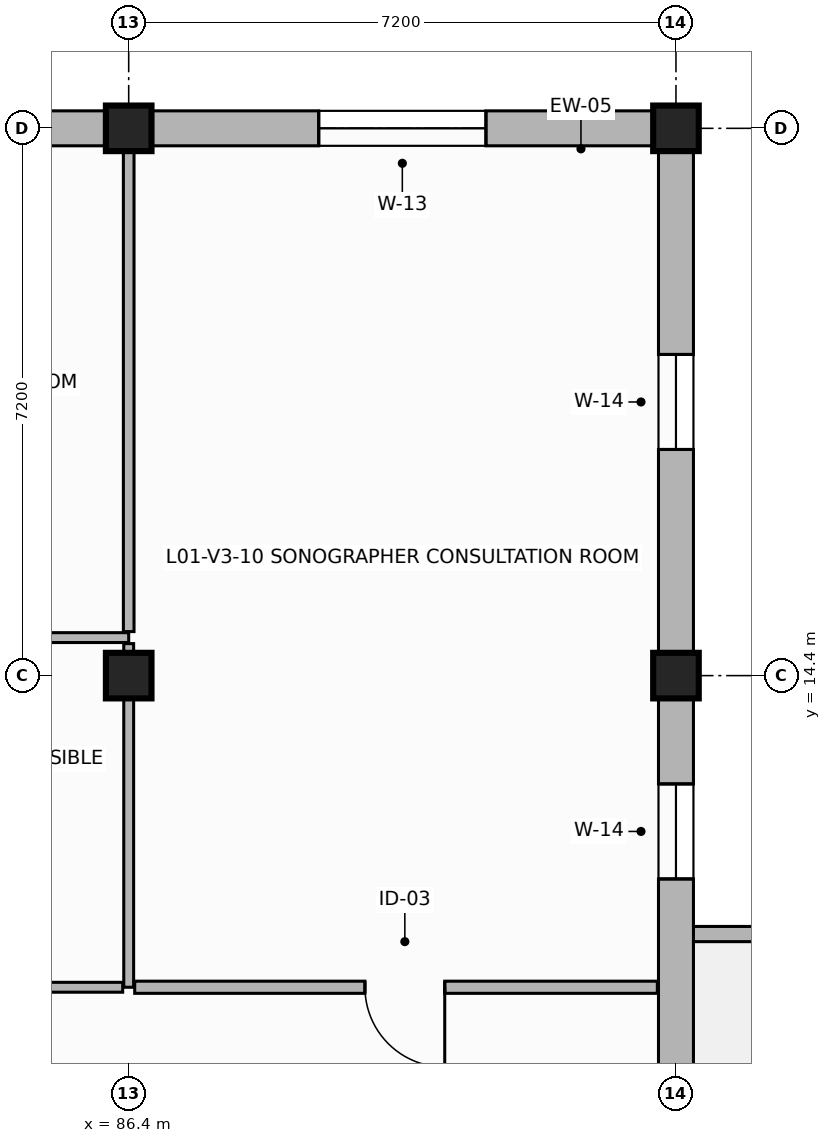
"""IFC4 building model, lengths in metres.
Left out: names, types, materials, properties, quantities, classifications, styles, units other than length and angle.
Written with IfcOpenShell. Run it as: python <this file> out.ifc"""

import sys

from ifc_helpers import new_model, si_unit, direction, frame, frame_2d, origin, origin_2d, place, context, subcontext, project, spatial, rectangle, extrude, element, fill, save


model = new_model("IFC4")
c1 = context("Model", 3, precision=1e-05, world=origin(), true_north=direction((0.0, 1.0)))
c2 = subcontext(c1, "Body", "Model", "MODEL_VIEW")
j1 = project(units=[si_unit("LENGTHUNIT", "METRE"), si_unit("PLANEANGLEUNIT", "RADIAN")], contexts=[c1])
p1 = place(None, origin())
s1 = spatial("IfcSite", under=j1, at=p1, CompositionType="ELEMENT")
p2 = place(p1, origin())
s2 = spatial("IfcBuilding", under=s1, at=p2, CompositionType="ELEMENT")
p3 = place(p2, frame((0.0, 0.0, 4.5)))
s3 = spatial("IfcBuildingStorey", under=s2, at=p3, CompositionType="ELEMENT", Elevation=4.5)
for number, where, z_axis, x_axis in (
    (1, (86.4, 14.4, 0.0), (0.0, 0.0, 1.0), (1.0, 0.0, 0.0)),
    (2, (86.4, 21.6, 0.0), (0.0, 0.0, 1.0), (1.0, 0.0, 0.0)),
    (3, (93.6, 14.4, 0.0), (0.0, 0.0, 1.0), (1.0, 0.0, 0.0)),
    (4, (93.6, 21.6, 0.0), (0.0, 0.0, 1.0), (1.0, 0.0, 0.0)),
):
    element("IfcColumn", number, at=place(p3, frame(where, z_axis=z_axis, x_axis=x_axis)), inside=s3, PredefinedType="COLUMN", context=c2, shape_type="SweptSolid", body=[
        extrude(rectangle(XDim=0.6, YDim=0.6, at=origin_2d()), origin(), (0.0, 0.0, 1.0), 3.55),
    ])
p4 = place(p3, frame((122.28, 11.0, 0.0), z_axis=(0.0, 0.0, 1.0), x_axis=(-1.0, 0.0, 0.0)))
e5 = element("IfcWall", 5, at=p4, inside=s3, PredefinedType="PARAPET", context=c2, shape_type="SweptSolid", body=[
    extrude(rectangle(XDim=28.56, YDim=0.2, at=frame_2d((14.28, 0.0))), origin(), (0.0, 0.0, 1.0), 0.95),
])
p5 = place(p3, frame((93.6, 7.2, 0.0), z_axis=(0.0, 0.0, 1.0), x_axis=(0.0, 1.0, 0.0)))
e6 = element("IfcWall", 6, at=p5, inside=s3, PredefinedType="SOLIDWALL", context=c2, shape_type="SweptSolid", body=[
    extrude(rectangle(XDim=7.2, YDim=0.46, at=frame_2d((3.6, 0.0))), origin(), (0.0, 0.0, 1.0), 2.83),
])
p6 = place(p5, frame((4.525, 0.0, 1.2)))
e7 = element("IfcOpeningElement", 7, at=p6, cuts=e6, PredefinedType="OPENING", context=c2, shape_type="SweptSolid", body=[
    extrude(rectangle(XDim=1.25, YDim=1.35, at=frame_2d((0.625, 0.675))), frame((0.0, 0.24, 0.0), z_axis=(0.0, -1.0, 0.0), x_axis=(1.0, 0.0, 0.0)), (0.0, 0.0, 1.0), 0.48),
])
p7 = place(p3, frame((93.6, 14.4, 0.0), z_axis=(0.0, 0.0, 1.0), x_axis=(0.0, 1.0, 0.0)))
e8 = element("IfcWall", 8, at=p7, inside=s3, PredefinedType="SOLIDWALL", context=c2, shape_type="SweptSolid", body=[
    extrude(rectangle(XDim=7.2, YDim=0.46, at=frame_2d((3.6, 0.0))), origin(), (0.0, 0.0, 1.0), 2.83),
])
p8 = place(p7, frame((2.975, 0.0, 1.2)))
e9 = element("IfcOpeningElement", 9, at=p8, cuts=e8, PredefinedType="OPENING", context=c2, shape_type="SweptSolid", body=[
    extrude(rectangle(XDim=1.25, YDim=1.35, at=frame_2d((0.625, 0.675))), frame((0.0, 0.24, 0.0), z_axis=(0.0, -1.0, 0.0), x_axis=(1.0, 0.0, 0.0)), (0.0, 0.0, 1.0), 0.48),
])
p9 = place(p3, frame((93.6, 21.6, 0.0), z_axis=(0.0, 0.0, 1.0), x_axis=(-1.0, 0.0, 0.0)))
e10 = element("IfcWall", 10, at=p9, inside=s3, PredefinedType="SOLIDWALL", context=c2, shape_type="SweptSolid", body=[
    extrude(rectangle(XDim=7.2, YDim=0.46, at=frame_2d((3.6, 0.0))), origin(), (0.0, 0.0, 1.0), 2.83),
])
p10 = place(p9, frame((2.5, 0.0, 1.2)))
e11 = element("IfcOpeningElement", 11, at=p10, cuts=e10, PredefinedType="OPENING", context=c2, shape_type="SweptSolid", body=[
    extrude(rectangle(XDim=2.2, YDim=1.1, at=frame_2d((1.1, 0.55))), frame((0.0, 0.24, 0.0), z_axis=(0.0, -1.0, 0.0), x_axis=(1.0, 0.0, 0.0)), (0.0, 0.0, 1.0), 0.48),
])
p11 = place(p3, frame((86.4, 21.6, 0.0), z_axis=(0.0, 0.0, 1.0), x_axis=(-1.0, 0.0, 0.0)))
e12 = element("IfcWall", 12, at=p11, inside=s3, PredefinedType="SOLIDWALL", context=c2, shape_type="SweptSolid", body=[
    extrude(rectangle(XDim=7.2, YDim=0.46, at=frame_2d((3.6, 0.0))), origin(), (0.0, 0.0, 1.0), 2.83),
])
p12 = place(p11, frame((2.5, 0.0, 1.2)))
e13 = element("IfcOpeningElement", 13, at=p12, cuts=e12, PredefinedType="OPENING", context=c2, shape_type="SweptSolid", body=[
    extrude(rectangle(XDim=2.2, YDim=1.1, at=frame_2d((1.1, 0.55))), frame((0.0, 0.24, 0.0), z_axis=(0.0, -1.0, 0.0), x_axis=(1.0, 0.0, 0.0)), (0.0, 0.0, 1.0), 0.48),
])
p13 = place(p3, frame((82.879, 14.9, 0.0), z_axis=(0.0, 0.0, 1.0), x_axis=(1.0, 0.0, 0.0)))
e14 = element("IfcWall", 14, at=p13, inside=s3, PredefinedType="PARTITIONING", context=c2, shape_type="SweptSolid", body=[
    extrude(rectangle(XDim=3.521, YDim=0.13, at=frame_2d((1.76, 0.0))), origin(), (0.0, 0.0, 1.0), 2.81),
])
p14 = place(p3, frame((86.4, 14.821, 0.0), z_axis=(0.0, 0.0, 1.0), x_axis=(0.0, -1.0, 0.0)))
e15 = element("IfcWall", 15, at=p14, inside=s3, PredefinedType="PARTITIONING", context=c2, shape_type="SweptSolid", body=[
    extrude(rectangle(XDim=4.521, YDim=0.13, at=frame_2d((2.26, 0.0))), origin(), (0.0, 0.0, 1.0), 2.81),
])
p15 = place(p3, frame((86.321, 10.3, 0.0), z_axis=(0.0, 0.0, 1.0), x_axis=(-1.0, 0.0, 0.0)))
e16 = element("IfcWall", 16, at=p15, inside=s3, PredefinedType="PARTITIONING", context=c2, shape_type="SweptSolid", body=[
    extrude(rectangle(XDim=3.442, YDim=0.13, at=frame_2d((1.721, 0.0))), origin(), (0.0, 0.0, 1.0), 2.81),
])
p16 = place(p15, frame((2.012, 0.0, 0.0)))
e17 = element("IfcOpeningElement", 17, at=p16, cuts=e16, PredefinedType="OPENING", context=c2, shape_type="SweptSolid", body=[
    extrude(rectangle(XDim=0.95, YDim=2.1, at=frame_2d((0.475, 1.05))), frame((0.0, 0.075, 0.0), z_axis=(0.0, -1.0, 0.0), x_axis=(1.0, 0.0, 0.0)), (0.0, 0.0, 1.0), 0.15),
])
p17 = place(p3, frame((86.4, 21.355, 0.0), z_axis=(0.0, 0.0, 1.0), x_axis=(0.0, -1.0, 0.0)))
e18 = element("IfcWall", 18, at=p17, inside=s3, PredefinedType="PARTITIONING", context=c2, shape_type="SweptSolid", body=[
    extrude(rectangle(XDim=6.376, YDim=0.14, at=frame_2d((3.188, 0.0))), origin(), (0.0, 0.0, 1.0), 2.81),
])
p18 = place(p3, frame((93.355, 10.3, 0.0), z_axis=(0.0, 0.0, 1.0), x_axis=(-1.0, 0.0, 0.0)))
e19 = element("IfcWall", 19, at=p18, inside=s3, PredefinedType="PARTITIONING", context=c2, shape_type="SweptSolid", body=[
    extrude(rectangle(XDim=6.876, YDim=0.16, at=frame_2d((3.438, 0.0))), origin(), (0.0, 0.0, 1.0), 2.81),
])
p19 = place(p18, frame((2.797, 0.0, 0.0)))
e20 = element("IfcOpeningElement", 20, at=p19, cuts=e19, PredefinedType="OPENING", context=c2, shape_type="SweptSolid", body=[
    extrude(rectangle(XDim=1.05, YDim=2.15, at=frame_2d((0.525, 1.075))), frame((0.0, 0.09, 0.0), z_axis=(0.0, -1.0, 0.0), x_axis=(1.0, 0.0, 0.0)), (0.0, 0.0, 1.0), 0.18),
])
p20 = place(p6, origin())
e21 = element("IfcWindow", 21, at=p20, inside=s3, PartitioningType="SINGLE_PANEL", PredefinedType="WINDOW", context=c2, shape_type="SweptSolid", body=[
    extrude(rectangle(XDim=1.25, YDim=1.35, at=frame_2d((0.625, 0.675))), frame((0.0, 0.03, 0.0), z_axis=(0.0, -1.0, 0.0), x_axis=(1.0, 0.0, 0.0)), (0.0, 0.0, 1.0), 0.06),
])
fill(e7, e21)
p21 = place(p8, origin())
e22 = element("IfcWindow", 22, at=p21, inside=s3, PartitioningType="SINGLE_PANEL", PredefinedType="WINDOW", context=c2, shape_type="SweptSolid", body=[
    extrude(rectangle(XDim=1.25, YDim=1.35, at=frame_2d((0.625, 0.675))), frame((0.0, 0.03, 0.0), z_axis=(0.0, -1.0, 0.0), x_axis=(1.0, 0.0, 0.0)), (0.0, 0.0, 1.0), 0.06),
])
fill(e9, e22)
p22 = place(p10, origin())
e23 = element("IfcWindow", 23, at=p22, inside=s3, PartitioningType="SINGLE_PANEL", PredefinedType="WINDOW", context=c2, shape_type="SweptSolid", body=[
    extrude(rectangle(XDim=2.2, YDim=1.1, at=frame_2d((1.1, 0.55))), frame((0.0, 0.03, 0.0), z_axis=(0.0, -1.0, 0.0), x_axis=(1.0, 0.0, 0.0)), (0.0, 0.0, 1.0), 0.06),
])
fill(e11, e23)
p23 = place(p19, origin())
e24 = element("IfcDoor", 24, at=p23, inside=s3, OperationType="SINGLE_SWING_LEFT", PredefinedType="DOOR", context=c2, shape_type="SweptSolid", body=[
    extrude(rectangle(XDim=1.05, YDim=2.15, at=frame_2d((0.525, 1.075))), frame((0.0, 0.025, 0.0), z_axis=(0.0, -1.0, 0.0), x_axis=(1.0, 0.0, 0.0)), (0.0, 0.0, 1.0), 0.05),
])
fill(e20, e24)
save(model, sys.argv[1])
